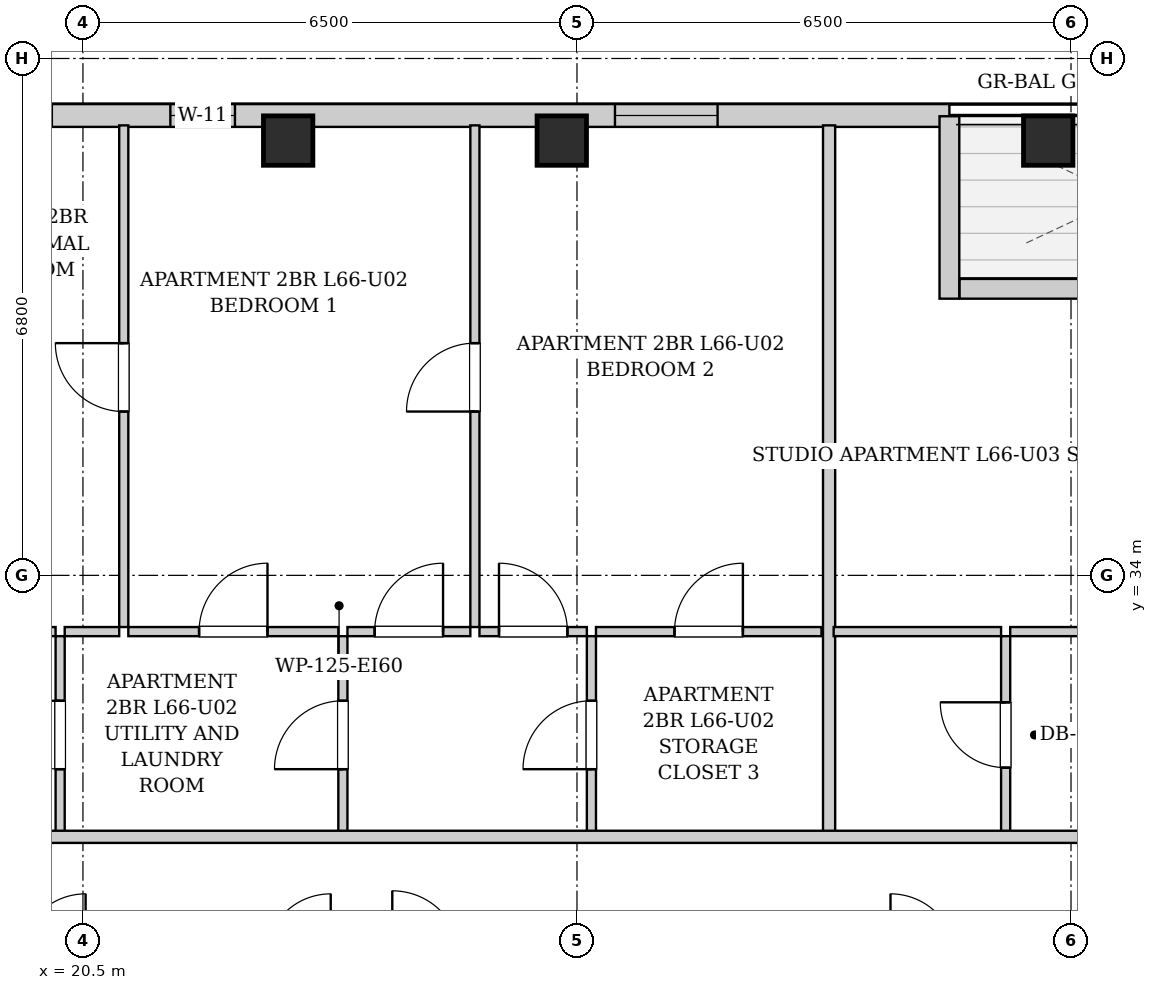
"""IFC4 building model, lengths in metres.
Left out: names, types, materials, properties, quantities, classifications, styles, units other than length and angle.
Written with IfcOpenShell. Run it as: python <this file> out.ifc"""

import sys

from ifc_helpers import new_model, si_unit, direction, frame, frame_2d, origin, origin_2d, place, context, subcontext, project, spatial, rectangle, extrude, element, fill, save


model = new_model("IFC4")
c1 = context("Model", 3, precision=1e-05, world=origin(), true_north=direction((0.0, 1.0)))
c2 = subcontext(c1, "Body", "Model", "MODEL_VIEW")
j1 = project(units=[si_unit("LENGTHUNIT", "METRE"), si_unit("PLANEANGLEUNIT", "RADIAN")], contexts=[c1])
p1 = place(None, origin())
s1 = spatial("IfcSite", under=j1, at=p1, CompositionType="ELEMENT")
p2 = place(p1, origin())
s2 = spatial("IfcBuilding", under=s1, at=p2, CompositionType="ELEMENT")
p3 = place(p2, frame((0.0, 0.0, 227.5)))
s3 = spatial("IfcBuildingStorey", under=s2, at=p3, CompositionType="ELEMENT", Elevation=227.5)
for number, where, z_axis, x_axis in (
    (1, (23.2, 39.72, 0.0), (0.0, 0.0, 1.0), (1.0, 0.0, 0.0)),
    (2, (26.8, 39.72, 0.0), (0.0, 0.0, 1.0), (1.0, 0.0, 0.0)),
    (3, (33.2, 39.72, 0.0), (0.0, 0.0, 1.0), (1.0, 0.0, 0.0)),
):
    element("IfcColumn", number, at=place(p3, frame(where, z_axis=z_axis, x_axis=x_axis)), inside=s3, PredefinedType="COLUMN", context=c2, shape_type="SweptSolid", body=[
        extrude(rectangle(XDim=0.65, YDim=0.65, at=origin_2d()), origin(), (0.0, 0.0, 1.0), 3.4),
    ])
p4 = place(p3, frame((13.1, 40.05, 0.0), z_axis=(0.0, 0.0, 1.0), x_axis=(1.0, 0.0, 0.0)))
e4 = element("IfcWall", 4, at=p4, inside=s3, PredefinedType="SOLIDWALL", context=c2, shape_type="SweptSolid", body=[
    extrude(rectangle(XDim=18.8, YDim=0.3, at=frame_2d((9.4, 0.0))), origin(), (0.0, 0.0, 1.0), 3.14),
])
p5 = place(p4, frame((1.806, 0.0, 0.55)))
e5 = element("IfcOpeningElement", 5, at=p5, cuts=e4, PredefinedType="OPENING", context=c2, shape_type="SweptSolid", body=[
    extrude(rectangle(XDim=1.35, YDim=1.2, at=frame_2d((0.675, 0.6))), frame((0.0, 0.16, 0.0), z_axis=(0.0, -1.0, 0.0), x_axis=(1.0, 0.0, 0.0)), (0.0, 0.0, 1.0), 0.32),
])
p6 = place(p4, frame((5.641, 0.0, 0.55)))
e6 = element("IfcOpeningElement", 6, at=p6, cuts=e4, PredefinedType="OPENING", context=c2, shape_type="SweptSolid", body=[
    extrude(rectangle(XDim=1.35, YDim=1.2, at=frame_2d((0.675, 0.6))), frame((0.0, 0.16, 0.0), z_axis=(0.0, -1.0, 0.0), x_axis=(1.0, 0.0, 0.0)), (0.0, 0.0, 1.0), 0.32),
])
p7 = place(p4, frame((8.55, 0.0, 0.55)))
e7 = element("IfcOpeningElement", 7, at=p7, cuts=e4, PredefinedType="OPENING", context=c2, shape_type="SweptSolid", body=[
    extrude(rectangle(XDim=0.85, YDim=1.2, at=frame_2d((0.425, 0.6))), frame((0.0, 0.16, 0.0), z_axis=(0.0, -1.0, 0.0), x_axis=(1.0, 0.0, 0.0)), (0.0, 0.0, 1.0), 0.32),
])
p8 = place(p4, frame((14.4, 0.0, 0.55)))
e8 = element("IfcOpeningElement", 8, at=p8, cuts=e4, PredefinedType="OPENING", context=c2, shape_type="SweptSolid", body=[
    extrude(rectangle(XDim=1.35, YDim=1.2, at=frame_2d((0.675, 0.6))), frame((0.0, 0.16, 0.0), z_axis=(0.0, -1.0, 0.0), x_axis=(1.0, 0.0, 0.0)), (0.0, 0.0, 1.0), 0.32),
])
p9 = place(p3, frame((31.9, 40.04, 0.0), z_axis=(0.0, 0.0, 1.0), x_axis=(0.0, -1.0, 0.0)))
e9 = element("IfcWall", 9, at=p9, inside=s3, PredefinedType="SOLIDWALL", context=c2, shape_type="SweptSolid", body=[
    extrude(rectangle(XDim=2.4, YDim=0.26, at=frame_2d((1.2, 0.0))), origin(), (0.0, 0.0, 1.0), 3.14),
])
p10 = place(p3, frame((32.034, 37.77, 0.0), z_axis=(0.0, 0.0, 1.0), x_axis=(1.0, 0.0, 0.0)))
e10 = element("IfcWall", 10, at=p10, inside=s3, PredefinedType="SOLIDWALL", context=c2, shape_type="SweptSolid", body=[
    extrude(rectangle(XDim=4.332, YDim=0.26, at=frame_2d((2.166, 0.0))), origin(), (0.0, 0.0, 1.0), 3.14),
])
p11 = place(p10, frame((1.616, 0.0, 0.0)))
e11 = element("IfcOpeningElement", 11, at=p11, cuts=e10, PredefinedType="OPENING", context=c2, shape_type="SweptSolid", body=[
    extrude(rectangle(XDim=1.1, YDim=2.0, at=frame_2d((0.55, 1.0))), frame((0.0, 0.14, 0.0), z_axis=(0.0, -1.0, 0.0), x_axis=(1.0, 0.0, 0.0)), (0.0, 0.0, 1.0), 0.28),
])
p12 = place(p3, frame((20.2, 30.6, 0.0), z_axis=(0.0, 0.0, 1.0), x_axis=(0.0, 1.0, 0.0)))
e12 = element("IfcWall", 12, at=p12, inside=s3, PredefinedType="PARTITIONING", context=c2, shape_type="SweptSolid", body=[
    extrude(rectangle(XDim=2.6, YDim=0.12, at=frame_2d((1.3, 0.0))), origin(), (0.0, 0.0, 1.0), 3.14),
])
p13 = place(p12, frame((0.85, 0.0, 0.0)))
e13 = element("IfcOpeningElement", 13, at=p13, cuts=e12, PredefinedType="OPENING", context=c2, shape_type="SweptSolid", body=[
    extrude(rectangle(XDim=0.9, YDim=2.05, at=frame_2d((0.45, 1.025))), frame((0.0, 0.07, 0.0), z_axis=(0.0, -1.0, 0.0), x_axis=(1.0, 0.0, 0.0)), (0.0, 0.0, 1.0), 0.14),
])
p14 = place(p3, frame((17.86, 33.26, 0.0), z_axis=(0.0, 0.0, 1.0), x_axis=(1.0, 0.0, 0.0)))
e14 = element("IfcWall", 14, at=p14, inside=s3, PredefinedType="PARTITIONING", context=c2, shape_type="SweptSolid", body=[
    extrude(rectangle(XDim=2.28, YDim=0.12, at=frame_2d((1.14, 0.0))), origin(), (0.0, 0.0, 1.0), 3.14),
])
p15 = place(p14, frame((0.69, 0.0, 0.0)))
e15 = element("IfcOpeningElement", 15, at=p15, cuts=e14, PredefinedType="OPENING", context=c2, shape_type="SweptSolid", body=[
    extrude(rectangle(XDim=0.9, YDim=2.05, at=frame_2d((0.45, 1.025))), frame((0.0, 0.07, 0.0), z_axis=(0.0, -1.0, 0.0), x_axis=(1.0, 0.0, 0.0)), (0.0, 0.0, 1.0), 0.14),
])
p16 = place(p3, frame((23.92, 30.6, 0.0), z_axis=(0.0, 0.0, 1.0), x_axis=(0.0, 1.0, 0.0)))
e16 = element("IfcWall", 16, at=p16, inside=s3, PredefinedType="PARTITIONING", context=c2, shape_type="SweptSolid", body=[
    extrude(rectangle(XDim=2.6, YDim=0.12, at=frame_2d((1.3, 0.0))), origin(), (0.0, 0.0, 1.0), 3.14),
])
p17 = place(p16, frame((0.85, 0.0, 0.0)))
e17 = element("IfcOpeningElement", 17, at=p17, cuts=e16, PredefinedType="OPENING", context=c2, shape_type="SweptSolid", body=[
    extrude(rectangle(XDim=0.9, YDim=2.05, at=frame_2d((0.45, 1.025))), frame((0.0, 0.07, 0.0), z_axis=(0.0, -1.0, 0.0), x_axis=(1.0, 0.0, 0.0)), (0.0, 0.0, 1.0), 0.14),
])
p18 = place(p3, frame((20.26, 33.26, 0.0), z_axis=(0.0, 0.0, 1.0), x_axis=(1.0, 0.0, 0.0)))
e18 = element("IfcWall", 18, at=p18, inside=s3, PredefinedType="PARTITIONING", context=c2, shape_type="SweptSolid", body=[
    extrude(rectangle(XDim=0.717, YDim=0.12, at=frame_2d((0.358, 0.0))), origin(), (0.0, 0.0, 1.0), 3.14),
])
p19 = place(p3, frame((21.097, 33.26, 0.0), z_axis=(0.0, 0.0, 1.0), x_axis=(1.0, 0.0, 0.0)))
e19 = element("IfcWall", 19, at=p19, inside=s3, PredefinedType="PARTITIONING", context=c2, shape_type="SweptSolid", body=[
    extrude(rectangle(XDim=2.763, YDim=0.12, at=frame_2d((1.382, 0.0))), origin(), (0.0, 0.0, 1.0), 3.14),
])
p20 = place(p19, frame((0.931, 0.0, 0.0)))
e20 = element("IfcOpeningElement", 20, at=p20, cuts=e19, PredefinedType="OPENING", context=c2, shape_type="SweptSolid", body=[
    extrude(rectangle(XDim=0.9, YDim=2.05, at=frame_2d((0.45, 1.025))), frame((0.0, 0.07, 0.0), z_axis=(0.0, -1.0, 0.0), x_axis=(1.0, 0.0, 0.0)), (0.0, 0.0, 1.0), 0.14),
])
p21 = place(p3, frame((27.19, 30.6, 0.0), z_axis=(0.0, 0.0, 1.0), x_axis=(0.0, 1.0, 0.0)))
e21 = element("IfcWall", 21, at=p21, inside=s3, PredefinedType="PARTITIONING", context=c2, shape_type="SweptSolid", body=[
    extrude(rectangle(XDim=2.6, YDim=0.12, at=frame_2d((1.3, 0.0))), origin(), (0.0, 0.0, 1.0), 3.14),
])
p22 = place(p21, frame((0.85, 0.0, 0.0)))
e22 = element("IfcOpeningElement", 22, at=p22, cuts=e21, PredefinedType="OPENING", context=c2, shape_type="SweptSolid", body=[
    extrude(rectangle(XDim=0.9, YDim=2.05, at=frame_2d((0.45, 1.025))), frame((0.0, 0.07, 0.0), z_axis=(0.0, -1.0, 0.0), x_axis=(1.0, 0.0, 0.0)), (0.0, 0.0, 1.0), 0.14),
])
p23 = place(p3, frame((23.98, 33.26, 0.0), z_axis=(0.0, 0.0, 1.0), x_axis=(1.0, 0.0, 0.0)))
e23 = element("IfcWall", 23, at=p23, inside=s3, PredefinedType="PARTITIONING", context=c2, shape_type="SweptSolid", body=[
    extrude(rectangle(XDim=1.617, YDim=0.12, at=frame_2d((0.809, 0.0))), origin(), (0.0, 0.0, 1.0), 3.14),
])
p24 = place(p23, frame((0.358, 0.0, 0.0)))
e24 = element("IfcOpeningElement", 24, at=p24, cuts=e23, PredefinedType="OPENING", context=c2, shape_type="SweptSolid", body=[
    extrude(rectangle(XDim=0.9, YDim=2.05, at=frame_2d((0.45, 1.025))), frame((0.0, 0.07, 0.0), z_axis=(0.0, -1.0, 0.0), x_axis=(1.0, 0.0, 0.0)), (0.0, 0.0, 1.0), 0.14),
])
p25 = place(p3, frame((25.717, 33.26, 0.0), z_axis=(0.0, 0.0, 1.0), x_axis=(1.0, 0.0, 0.0)))
e25 = element("IfcWall", 25, at=p25, inside=s3, PredefinedType="PARTITIONING", context=c2, shape_type="SweptSolid", body=[
    extrude(rectangle(XDim=1.413, YDim=0.12, at=frame_2d((0.707, 0.0))), origin(), (0.0, 0.0, 1.0), 3.14),
])
p26 = place(p25, frame((0.257, 0.0, 0.0)))
e26 = element("IfcOpeningElement", 26, at=p26, cuts=e25, PredefinedType="OPENING", context=c2, shape_type="SweptSolid", body=[
    extrude(rectangle(XDim=0.9, YDim=2.05, at=frame_2d((0.45, 1.025))), frame((0.0, 0.07, 0.0), z_axis=(0.0, -1.0, 0.0), x_axis=(1.0, 0.0, 0.0)), (0.0, 0.0, 1.0), 0.14),
])
p27 = place(p3, frame((27.25, 33.26, 0.0), z_axis=(0.0, 0.0, 1.0), x_axis=(1.0, 0.0, 0.0)))
e27 = element("IfcWall", 27, at=p27, inside=s3, PredefinedType="PARTITIONING", context=c2, shape_type="SweptSolid", body=[
    extrude(rectangle(XDim=2.967, YDim=0.12, at=frame_2d((1.483, 0.0))), origin(), (0.0, 0.0, 1.0), 3.14),
])
p28 = place(p27, frame((1.033, 0.0, 0.0)))
e28 = element("IfcOpeningElement", 28, at=p28, cuts=e27, PredefinedType="OPENING", context=c2, shape_type="SweptSolid", body=[
    extrude(rectangle(XDim=0.9, YDim=2.05, at=frame_2d((0.45, 1.025))), frame((0.0, 0.07, 0.0), z_axis=(0.0, -1.0, 0.0), x_axis=(1.0, 0.0, 0.0)), (0.0, 0.0, 1.0), 0.14),
])
p29 = place(p3, frame((21.037, 33.32, 0.0), z_axis=(0.0, 0.0, 1.0), x_axis=(0.0, 1.0, 0.0)))
e29 = element("IfcWall", 29, at=p29, inside=s3, PredefinedType="PARTITIONING", context=c2, shape_type="SweptSolid", body=[
    extrude(rectangle(XDim=6.6, YDim=0.12, at=frame_2d((3.3, 0.0))), origin(), (0.0, 0.0, 1.0), 3.14),
])
p30 = place(p29, frame((2.835, 0.0, 0.0)))
e30 = element("IfcOpeningElement", 30, at=p30, cuts=e29, PredefinedType="OPENING", context=c2, shape_type="SweptSolid", body=[
    extrude(rectangle(XDim=0.9, YDim=2.05, at=frame_2d((0.45, 1.025))), frame((0.0, 0.07, 0.0), z_axis=(0.0, -1.0, 0.0), x_axis=(1.0, 0.0, 0.0)), (0.0, 0.0, 1.0), 0.14),
])
p31 = place(p3, frame((25.657, 33.32, 0.0), z_axis=(0.0, 0.0, 1.0), x_axis=(0.0, 1.0, 0.0)))
e31 = element("IfcWall", 31, at=p31, inside=s3, PredefinedType="PARTITIONING", context=c2, shape_type="SweptSolid", body=[
    extrude(rectangle(XDim=6.6, YDim=0.12, at=frame_2d((3.3, 0.0))), origin(), (0.0, 0.0, 1.0), 3.14),
])
p32 = place(p31, frame((2.835, 0.0, 0.0)))
e32 = element("IfcOpeningElement", 32, at=p32, cuts=e31, PredefinedType="OPENING", context=c2, shape_type="SweptSolid", body=[
    extrude(rectangle(XDim=0.9, YDim=2.05, at=frame_2d((0.45, 1.025))), frame((0.0, 0.07, 0.0), z_axis=(0.0, -1.0, 0.0), x_axis=(1.0, 0.0, 0.0)), (0.0, 0.0, 1.0), 0.14),
])
p33 = place(p3, frame((30.317, 30.6, 0.0), z_axis=(0.0, 0.0, 1.0), x_axis=(0.0, 1.0, 0.0)))
e33 = element("IfcWall", 33, at=p33, inside=s3, PredefinedType="PARTITIONING", context=c2, shape_type="SweptSolid", body=[
    extrude(rectangle(XDim=9.32, YDim=0.16, at=frame_2d((4.66, 0.0))), origin(), (0.0, 0.0, 1.0), 3.14),
])
p34 = place(p3, frame((32.64, 30.6, 0.0), z_axis=(0.0, 0.0, 1.0), x_axis=(0.0, 1.0, 0.0)))
e34 = element("IfcWall", 34, at=p34, inside=s3, PredefinedType="PARTITIONING", context=c2, shape_type="SweptSolid", body=[
    extrude(rectangle(XDim=2.6, YDim=0.12, at=frame_2d((1.3, 0.0))), origin(), (0.0, 0.0, 1.0), 3.14),
])
p35 = place(p34, frame((0.87, 0.0, 0.0)))
e35 = element("IfcOpeningElement", 35, at=p35, cuts=e34, PredefinedType="OPENING", context=c2, shape_type="SweptSolid", body=[
    extrude(rectangle(XDim=0.86, YDim=2.05, at=frame_2d((0.43, 1.025))), frame((0.0, 0.07, 0.0), z_axis=(0.0, -1.0, 0.0), x_axis=(1.0, 0.0, 0.0)), (0.0, 0.0, 1.0), 0.14),
])
p36 = place(p3, frame((30.377, 33.26, 0.0), z_axis=(0.0, 0.0, 1.0), x_axis=(1.0, 0.0, 0.0)))
e36 = element("IfcWall", 36, at=p36, inside=s3, PredefinedType="PARTITIONING", context=c2, shape_type="SweptSolid", body=[
    extrude(rectangle(XDim=2.203, YDim=0.12, at=frame_2d((1.102, 0.0))), origin(), (0.0, 0.0, 1.0), 3.14),
])
p37 = place(p3, frame((32.7, 33.26, 0.0), z_axis=(0.0, 0.0, 1.0), x_axis=(1.0, 0.0, 0.0)))
e37 = element("IfcWall", 37, at=p37, inside=s3, PredefinedType="PARTITIONING", context=c2, shape_type="SweptSolid", body=[
    extrude(rectangle(XDim=5.02, YDim=0.12, at=frame_2d((2.51, 0.0))), origin(), (0.0, 0.0, 1.0), 3.14),
])
p38 = place(p37, frame((2.06, 0.0, 0.0)))
e38 = element("IfcOpeningElement", 38, at=p38, cuts=e37, PredefinedType="OPENING", context=c2, shape_type="SweptSolid", body=[
    extrude(rectangle(XDim=0.9, YDim=2.05, at=frame_2d((0.45, 1.025))), frame((0.0, 0.07, 0.0), z_axis=(0.0, -1.0, 0.0), x_axis=(1.0, 0.0, 0.0)), (0.0, 0.0, 1.0), 0.14),
])
p39 = place(p3, frame((13.15, 30.56, 0.0), z_axis=(0.0, 0.0, 1.0), x_axis=(1.0, 0.0, 0.0)))
e39 = element("IfcWall", 39, at=p39, inside=s3, PredefinedType="PARTITIONING", context=c2, shape_type="SweptSolid", body=[
    extrude(rectangle(XDim=24.6, YDim=0.16, at=frame_2d((12.3, 0.0))), origin(), (0.0, 0.0, 1.0), 3.14),
])
p40 = place(p39, frame((5.185, 0.0, 0.0)))
e40 = element("IfcOpeningElement", 40, at=p40, cuts=e39, PredefinedType="OPENING", context=c2, shape_type="SweptSolid", body=[
    extrude(rectangle(XDim=0.95, YDim=2.1, at=frame_2d((0.475, 1.05))), frame((0.0, 0.09, 0.0), z_axis=(0.0, -1.0, 0.0), x_axis=(1.0, 0.0, 0.0)), (0.0, 0.0, 1.0), 0.18),
])
p41 = place(p39, frame((21.55, 0.0, 0.0)))
e41 = element("IfcOpeningElement", 41, at=p41, cuts=e39, PredefinedType="OPENING", context=c2, shape_type="SweptSolid", body=[
    extrude(rectangle(XDim=0.95, YDim=2.1, at=frame_2d((0.475, 1.05))), frame((0.0, 0.09, 0.0), z_axis=(0.0, -1.0, 0.0), x_axis=(1.0, 0.0, 0.0)), (0.0, 0.0, 1.0), 0.18),
])
p42 = place(p13, origin())
e42 = element("IfcDoor", 42, at=p42, inside=s3, OperationType="SINGLE_SWING_RIGHT", PredefinedType="DOOR", context=c2, shape_type="SweptSolid", body=[
    extrude(rectangle(XDim=0.9, YDim=2.05, at=frame_2d((0.45, 1.025))), frame((0.0, 0.025, 0.0), z_axis=(0.0, -1.0, 0.0), x_axis=(1.0, 0.0, 0.0)), (0.0, 0.0, 1.0), 0.05),
])
fill(e13, e42)
p43 = place(p17, origin())
e43 = element("IfcDoor", 43, at=p43, inside=s3, OperationType="SINGLE_SWING_LEFT", PredefinedType="DOOR", context=c2, shape_type="SweptSolid", body=[
    extrude(rectangle(XDim=0.9, YDim=2.05, at=frame_2d((0.45, 1.025))), frame((0.0, 0.025, 0.0), z_axis=(0.0, -1.0, 0.0), x_axis=(1.0, 0.0, 0.0)), (0.0, 0.0, 1.0), 0.05),
])
fill(e17, e43)
p44 = place(p20, origin())
e44 = element("IfcDoor", 44, at=p44, inside=s3, OperationType="SINGLE_SWING_RIGHT", PredefinedType="DOOR", context=c2, shape_type="SweptSolid", body=[
    extrude(rectangle(XDim=0.9, YDim=2.05, at=frame_2d((0.45, 1.025))), frame((0.0, 0.025, 0.0), z_axis=(0.0, -1.0, 0.0), x_axis=(1.0, 0.0, 0.0)), (0.0, 0.0, 1.0), 0.05),
])
fill(e20, e44)
p45 = place(p22, origin())
e45 = element("IfcDoor", 45, at=p45, inside=s3, OperationType="SINGLE_SWING_LEFT", PredefinedType="DOOR", context=c2, shape_type="SweptSolid", body=[
    extrude(rectangle(XDim=0.9, YDim=2.05, at=frame_2d((0.45, 1.025))), frame((0.0, 0.025, 0.0), z_axis=(0.0, -1.0, 0.0), x_axis=(1.0, 0.0, 0.0)), (0.0, 0.0, 1.0), 0.05),
])
fill(e22, e45)
p46 = place(p24, origin())
e46 = element("IfcDoor", 46, at=p46, inside=s3, OperationType="SINGLE_SWING_RIGHT", PredefinedType="DOOR", context=c2, shape_type="SweptSolid", body=[
    extrude(rectangle(XDim=0.9, YDim=2.05, at=frame_2d((0.45, 1.025))), frame((0.0, 0.025, 0.0), z_axis=(0.0, -1.0, 0.0), x_axis=(1.0, 0.0, 0.0)), (0.0, 0.0, 1.0), 0.05),
])
fill(e24, e46)
p47 = place(p26, origin())
e47 = element("IfcDoor", 47, at=p47, inside=s3, OperationType="SINGLE_SWING_LEFT", PredefinedType="DOOR", context=c2, shape_type="SweptSolid", body=[
    extrude(rectangle(XDim=0.9, YDim=2.05, at=frame_2d((0.45, 1.025))), frame((0.0, 0.025, 0.0), z_axis=(0.0, -1.0, 0.0), x_axis=(1.0, 0.0, 0.0)), (0.0, 0.0, 1.0), 0.05),
])
fill(e26, e47)
p48 = place(p28, origin())
e48 = element("IfcDoor", 48, at=p48, inside=s3, OperationType="SINGLE_SWING_RIGHT", PredefinedType="DOOR", context=c2, shape_type="SweptSolid", body=[
    extrude(rectangle(XDim=0.9, YDim=2.05, at=frame_2d((0.45, 1.025))), frame((0.0, 0.025, 0.0), z_axis=(0.0, -1.0, 0.0), x_axis=(1.0, 0.0, 0.0)), (0.0, 0.0, 1.0), 0.05),
])
fill(e28, e48)
p49 = place(p30, origin())
e49 = element("IfcDoor", 49, at=p49, inside=s3, OperationType="SINGLE_SWING_RIGHT", PredefinedType="DOOR", context=c2, shape_type="SweptSolid", body=[
    extrude(rectangle(XDim=0.9, YDim=2.05, at=frame_2d((0.45, 1.025))), frame((0.0, 0.025, 0.0), z_axis=(0.0, -1.0, 0.0), x_axis=(1.0, 0.0, 0.0)), (0.0, 0.0, 1.0), 0.05),
])
fill(e30, e49)
p50 = place(p32, origin())
e50 = element("IfcDoor", 50, at=p50, inside=s3, OperationType="SINGLE_SWING_LEFT", PredefinedType="DOOR", context=c2, shape_type="SweptSolid", body=[
    extrude(rectangle(XDim=0.9, YDim=2.05, at=frame_2d((0.45, 1.025))), frame((0.0, 0.025, 0.0), z_axis=(0.0, -1.0, 0.0), x_axis=(1.0, 0.0, 0.0)), (0.0, 0.0, 1.0), 0.05),
])
fill(e32, e50)
p51 = place(p35, origin())
e51 = element("IfcDoor", 51, at=p51, inside=s3, OperationType="SINGLE_SWING_RIGHT", PredefinedType="DOOR", context=c2, shape_type="SweptSolid", body=[
    extrude(rectangle(XDim=0.86, YDim=2.05, at=frame_2d((0.43, 1.025))), frame((0.0, 0.025, 0.0), z_axis=(0.0, -1.0, 0.0), x_axis=(1.0, 0.0, 0.0)), (0.0, 0.0, 1.0), 0.05),
])
fill(e35, e51)
p52 = place(p7, origin())
e52 = element("IfcWindow", 52, at=p52, inside=s3, PartitioningType="SINGLE_PANEL", PredefinedType="WINDOW", context=c2, shape_type="SweptSolid", body=[
    extrude(rectangle(XDim=0.85, YDim=1.2, at=frame_2d((0.425, 0.6))), frame((0.0, 0.03, 0.0), z_axis=(0.0, -1.0, 0.0), x_axis=(1.0, 0.0, 0.0)), (0.0, 0.0, 1.0), 0.06),
])
fill(e7, e52)
p53 = place(p8, origin())
e53 = element("IfcWindow", 53, at=p53, inside=s3, PartitioningType="SINGLE_PANEL", PredefinedType="WINDOW", context=c2, shape_type="SweptSolid", body=[
    extrude(rectangle(XDim=1.35, YDim=1.2, at=frame_2d((0.675, 0.6))), frame((0.0, 0.03, 0.0), z_axis=(0.0, -1.0, 0.0), x_axis=(1.0, 0.0, 0.0)), (0.0, 0.0, 1.0), 0.06),
])
fill(e8, e53)
save(model, sys.argv[1])
